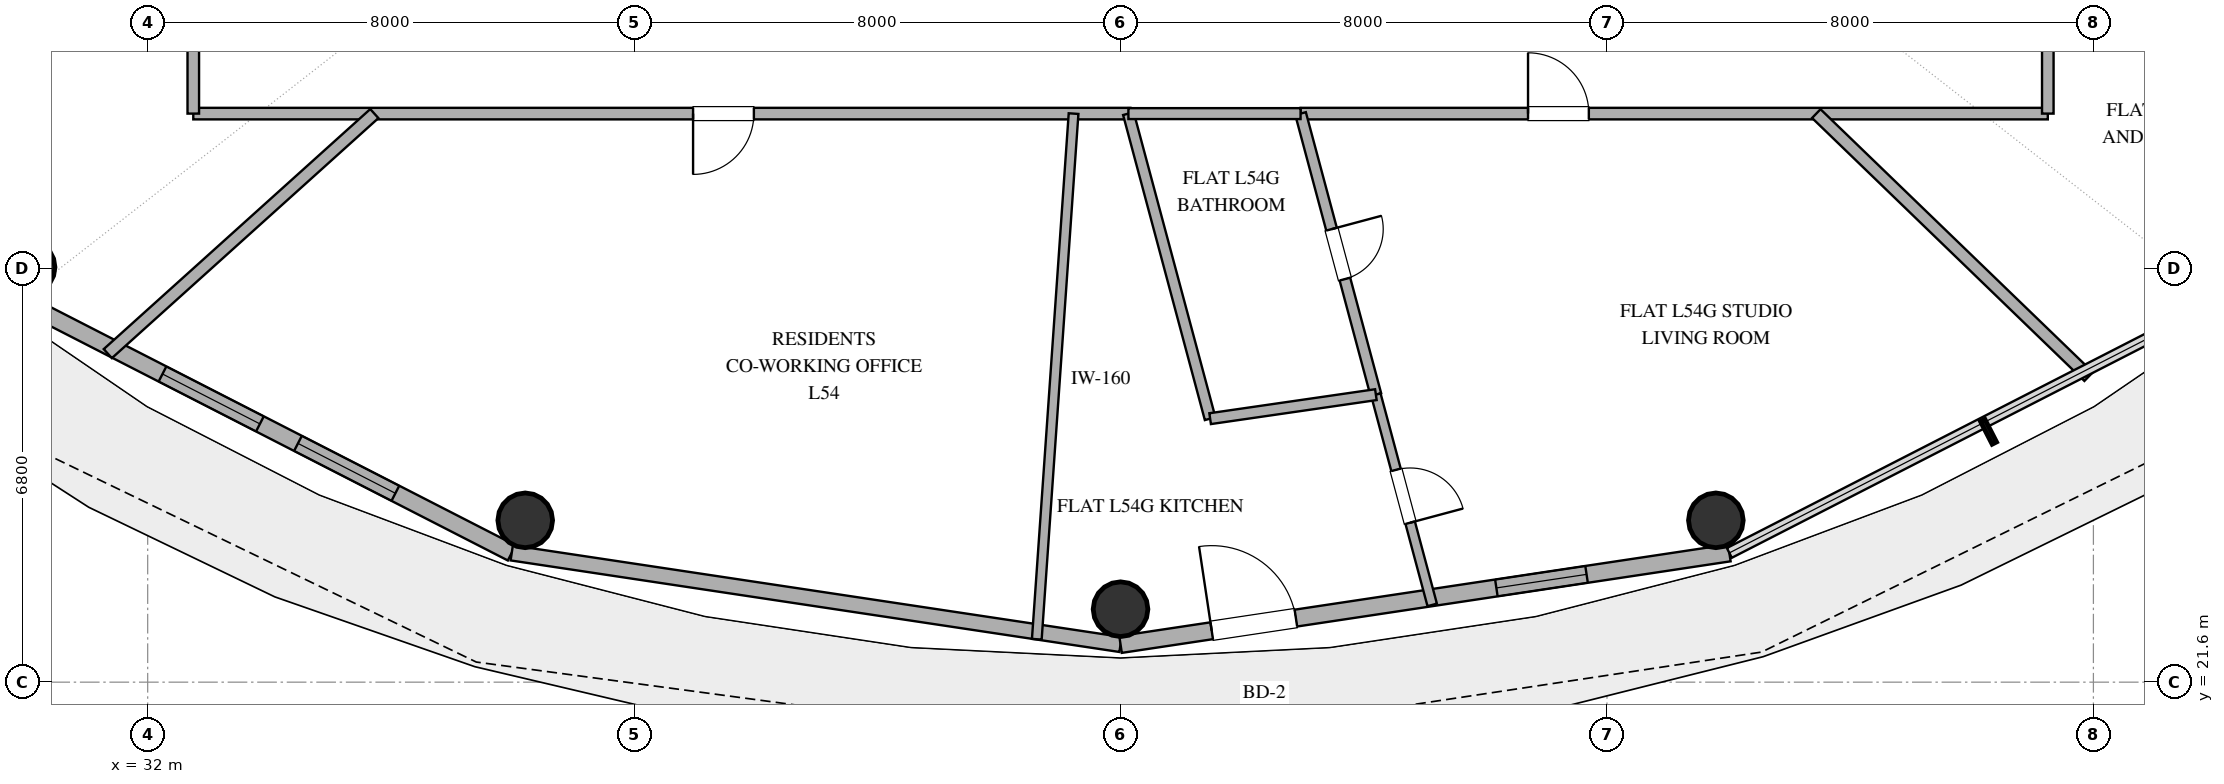
"""IFC4 building model, lengths in metres.
Left out: names, types, materials, properties, quantities, classifications, styles, units other than length and angle.
Written with IfcOpenShell. Run it as: python <this file> out.ifc"""

import sys

from ifc_helpers import new_model, si_unit, direction, frame, frame_2d, origin, origin_2d, place, context, subcontext, project, spatial, rectangle, hollow_circle, extrude, element, fill, save


model = new_model("IFC4")
c1 = context("Model", 3, precision=1e-05, world=origin(), true_north=direction((0.0, 1.0)))
c2 = subcontext(c1, "Body", "Model", "MODEL_VIEW")
j1 = project(units=[si_unit("LENGTHUNIT", "METRE"), si_unit("PLANEANGLEUNIT", "RADIAN")], contexts=[c1])
p1 = place(None, origin())
s1 = spatial("IfcSite", under=j1, at=p1, CompositionType="ELEMENT")
p2 = place(p1, origin())
s2 = spatial("IfcBuilding", under=s1, at=p2, CompositionType="ELEMENT")
p3 = place(p2, frame((0.0, 0.0, 213.6)))
s3 = spatial("IfcBuildingStorey", under=s2, at=p3, CompositionType="ELEMENT", Elevation=213.6)
for number, where, z_axis, x_axis in (
    (1, (30.025, 28.424, 0.0), (0.0, 0.0, 1.0), (1.0, 0.0, 0.0)),
    (2, (38.209, 24.261, 0.0), (0.0, 0.0, 1.0), (1.0, 0.0, 0.0)),
    (3, (48.0, 22.8, 0.0), (0.0, 0.0, 1.0), (1.0, 0.0, 0.0)),
    (4, (57.791, 24.261, 0.0), (0.0, 0.0, 1.0), (1.0, 0.0, 0.0)),
):
    element("IfcColumn", number, at=place(p3, frame(where, z_axis=z_axis, x_axis=x_axis)), inside=s3, PredefinedType="COLUMN", context=c2, shape_type="SweptSolid", body=[
        extrude(hollow_circle(Radius=0.45, WallThickness=0.025, at=origin_2d()), origin(), (0.0, 0.0, 1.0), 3.36),
    ])
p4 = place(p3, frame((29.617, 28.013, 0.0), z_axis=(0.0, 0.0, 1.0), x_axis=(0.890007394051, -0.455946091699, 0.0)))
e5 = element("IfcWall", 5, at=p4, inside=s3, PredefinedType="SOLIDWALL", context=c2, shape_type="SweptSolid", body=[
    extrude(rectangle(XDim=9.404, YDim=0.28, at=frame_2d((4.702, 0.0))), origin(), (0.0, 0.0, 1.0), 3.36),
])
p5 = place(p4, frame((2.951, 0.0, 0.85)))
e6 = element("IfcOpeningElement", 6, at=p5, cuts=e5, PredefinedType="OPENING", context=c2, shape_type="SweptSolid", body=[
    extrude(rectangle(XDim=1.8, YDim=2.2, at=frame_2d((0.9, 1.1))), frame((0.0, 0.15, 0.0), z_axis=(0.0, -1.0, 0.0), x_axis=(1.0, 0.0, 0.0)), (0.0, 0.0, 1.0), 0.3),
])
p6 = place(p4, frame((5.454, 0.0, 0.85)))
e7 = element("IfcOpeningElement", 7, at=p6, cuts=e5, PredefinedType="OPENING", context=c2, shape_type="SweptSolid", body=[
    extrude(rectangle(XDim=1.8, YDim=2.2, at=frame_2d((0.9, 1.1))), frame((0.0, 0.15, 0.0), z_axis=(0.0, -1.0, 0.0), x_axis=(1.0, 0.0, 0.0)), (0.0, 0.0, 1.0), 0.3),
])
p7 = place(p3, frame((37.987, 23.726, 0.0), z_axis=(0.0, 0.0, 1.0), x_axis=(0.988882522213, -0.148698881169, 0.0)))
e8 = element("IfcWall", 8, at=p7, inside=s3, PredefinedType="SOLIDWALL", context=c2, shape_type="SweptSolid", body=[
    extrude(rectangle(XDim=10.125, YDim=0.25, at=frame_2d((5.062, 0.0))), origin(), (0.0, 0.0, 1.0), 3.36),
])
p8 = place(p3, frame((48.0, 22.22, 0.0), z_axis=(0.0, 0.0, 1.0), x_axis=(0.988882522213, 0.148698881169, 0.0)))
e9 = element("IfcWall", 9, at=p8, inside=s3, PredefinedType="SOLIDWALL", context=c2, shape_type="SweptSolid", body=[
    extrude(rectangle(XDim=10.125, YDim=0.28, at=frame_2d((5.062, 0.0))), origin(), (0.0, 0.0, 1.0), 3.36),
])
p9 = place(p8, frame((1.516, 0.0, 0.0)))
e10 = element("IfcOpeningElement", 10, at=p9, cuts=e9, PredefinedType="OPENING", context=c2, shape_type="SweptSolid", body=[
    extrude(rectangle(XDim=1.4, YDim=2.2, at=frame_2d((0.7, 1.1))), frame((0.0, 0.15, 0.0), z_axis=(0.0, -1.0, 0.0), x_axis=(1.0, 0.0, 0.0)), (0.0, 0.0, 1.0), 0.3),
])
p10 = place(p8, frame((6.25, 0.0, 0.85)))
e11 = element("IfcOpeningElement", 11, at=p10, cuts=e9, PredefinedType="OPENING", context=c2, shape_type="SweptSolid", body=[
    extrude(rectangle(XDim=1.5, YDim=1.8, at=frame_2d((0.75, 0.9))), frame((0.0, 0.15, 0.0), z_axis=(0.0, -1.0, 0.0), x_axis=(1.0, 0.0, 0.0)), (0.0, 0.0, 1.0), 0.3),
])
p11 = place(p3, frame((48.162, 30.95, 0.0), z_axis=(0.0, 0.0, 1.0), x_axis=(-1.0, 0.0, 0.0)))
e12 = element("IfcWall", 12, at=p11, inside=s3, PredefinedType="PARTITIONING", context=c2, shape_type="SweptSolid", body=[
    extrude(rectangle(XDim=15.412, YDim=0.19, at=frame_2d((7.706, 0.0))), origin(), (0.0, 0.0, 1.0), 2.72),
])
p12 = place(p11, frame((6.193, 0.0, 0.0)))
e13 = element("IfcOpeningElement", 13, at=p12, cuts=e12, PredefinedType="OPENING", context=c2, shape_type="SweptSolid", body=[
    extrude(rectangle(XDim=1.0, YDim=2.2, at=frame_2d((0.5, 1.1))), frame((0.0, 0.105, 0.0), z_axis=(0.0, -1.0, 0.0), x_axis=(1.0, 0.0, 0.0)), (0.0, 0.0, 1.0), 0.21),
])
p13 = place(p3, frame((47.227, 30.95, 0.0), z_axis=(0.0, 0.0, 1.0), x_axis=(-0.069763237321, -0.997563577281, 0.0)))
e14 = element("IfcWall", 14, at=p13, inside=s3, PredefinedType="PLUMBINGWALL", context=c2, shape_type="SweptSolid", body=[
    extrude(rectangle(XDim=8.665, YDim=0.16, at=frame_2d((4.333, 0.0))), origin(), (0.0, 0.0, 1.0), 2.72),
])
p14 = place(p3, frame((50.961, 30.95, 0.0), z_axis=(0.0, 0.0, 1.0), x_axis=(1.0, 0.0, 0.0)))
e15 = element("IfcWall", 15, at=p14, inside=s3, PredefinedType="PARTITIONING", context=c2, shape_type="SweptSolid", body=[
    extrude(rectangle(XDim=12.289, YDim=0.19, at=frame_2d((6.145, 0.0))), origin(), (0.0, 0.0, 1.0), 2.72),
])
p15 = place(p14, frame((3.741, 0.0, 0.0)))
e16 = element("IfcOpeningElement", 16, at=p15, cuts=e15, PredefinedType="OPENING", context=c2, shape_type="SweptSolid", body=[
    extrude(rectangle(XDim=1.0, YDim=2.2, at=frame_2d((0.5, 1.1))), frame((0.0, 0.105, 0.0), z_axis=(0.0, -1.0, 0.0), x_axis=(1.0, 0.0, 0.0)), (0.0, 0.0, 1.0), 0.21),
])
p16 = place(p3, frame((32.75, 30.95, 0.0), z_axis=(0.0, 0.0, 1.0), x_axis=(0.0, 1.0, 0.0)))
e17 = element("IfcWall", 17, at=p16, inside=s3, PredefinedType="PARTITIONING", context=c2, shape_type="SweptSolid", body=[
    extrude(rectangle(XDim=12.148, YDim=0.19, at=frame_2d((6.074, 0.0))), origin(), (0.0, 0.0, 1.0), 2.72),
])
p17 = place(p16, frame((3.214, 0.0, 0.0)))
e18 = element("IfcOpeningElement", 18, at=p17, cuts=e17, PredefinedType="OPENING", context=c2, shape_type="SweptSolid", body=[
    extrude(rectangle(XDim=1.0, YDim=2.2, at=frame_2d((0.5, 1.1))), frame((0.0, 0.105, 0.0), z_axis=(0.0, -1.0, 0.0), x_axis=(1.0, 0.0, 0.0)), (0.0, 0.0, 1.0), 0.21),
])
p18 = place(p3, frame((63.921, 26.625, 0.0), z_axis=(0.0, 0.0, 1.0), x_axis=(-0.719350784266, 0.69464699609, 0.0)))
e19 = element("IfcWall", 19, at=p18, inside=s3, PredefinedType="PARTITIONING", context=c2, shape_type="SweptSolid", body=[
    extrude(rectangle(XDim=6.226, YDim=0.2, at=frame_2d((3.113, 0.0))), origin(), (0.0, 0.0, 1.0), 2.72),
])
p19 = place(p3, frame((63.25, 45.419, 0.0), z_axis=(0.0, 0.0, 1.0), x_axis=(0.0, -1.0, 0.0)))
e20 = element("IfcWall", 20, at=p19, inside=s3, PredefinedType="PARTITIONING", context=c2, shape_type="SweptSolid", body=[
    extrude(rectangle(XDim=14.469, YDim=0.19, at=frame_2d((7.235, 0.0))), origin(), (0.0, 0.0, 1.0), 2.72),
])
p20 = place(p19, frame((10.905, 0.0, 0.0)))
e21 = element("IfcOpeningElement", 21, at=p20, cuts=e20, PredefinedType="OPENING", context=c2, shape_type="SweptSolid", body=[
    extrude(rectangle(XDim=1.0, YDim=2.2, at=frame_2d((0.5, 1.1))), frame((0.0, 0.105, 0.0), z_axis=(0.0, -1.0, 0.0), x_axis=(1.0, 0.0, 0.0)), (0.0, 0.0, 1.0), 0.21),
])
p21 = place(p3, frame((35.728, 30.95, 0.0), z_axis=(0.0, 0.0, 1.0), x_axis=(-0.743158305959, -0.669115634464, 0.0)))
e22 = element("IfcWall", 22, at=p21, inside=s3, PredefinedType="PARTITIONING", context=c2, shape_type="SweptSolid", body=[
    extrude(rectangle(XDim=5.899, YDim=0.2, at=frame_2d((2.949, 0.0))), origin(), (0.0, 0.0, 1.0), 2.72),
])
p22 = place(p3, frame((49.473, 25.933, 0.0), z_axis=(0.0, 0.0, 1.0), x_axis=(-0.258826939486, 0.965923710961, 0.0)))
e23 = element("IfcWall", 23, at=p22, inside=s3, PredefinedType="PLUMBINGWALL", context=c2, shape_type="SweptSolid", body=[
    extrude(rectangle(XDim=5.194, YDim=0.18, at=frame_2d((2.597, 0.0))), origin(), (0.0, 0.0, 1.0), 2.72),
])
p23 = place(p3, frame((50.961, 30.95, 0.0), z_axis=(0.0, 0.0, 1.0), x_axis=(0.258827893949, -0.965923455204, 0.0)))
e24 = element("IfcWall", 24, at=p23, inside=s3, PredefinedType="PLUMBINGWALL", context=c2, shape_type="SweptSolid", body=[
    extrude(rectangle(XDim=4.785, YDim=0.18, at=frame_2d((2.393, 0.0))), origin(), (0.0, 0.0, 1.0), 2.72),
])
p24 = place(p23, frame((1.968, 0.0, 0.0)))
e25 = element("IfcOpeningElement", 25, at=p24, cuts=e24, PredefinedType="OPENING", context=c2, shape_type="SweptSolid", body=[
    extrude(rectangle(XDim=0.85, YDim=2.1, at=frame_2d((0.425, 1.05))), frame((0.0, 0.1, 0.0), z_axis=(0.0, -1.0, 0.0), x_axis=(1.0, 0.0, 0.0)), (0.0, 0.0, 1.0), 0.2),
])
p25 = place(p3, frame((52.199, 26.328, 0.0), z_axis=(0.0, 0.0, 1.0), x_axis=(0.258821309613, -0.965925219512, 0.0)))
e26 = element("IfcWall", 26, at=p25, inside=s3, PredefinedType="PLUMBINGWALL", context=c2, shape_type="SweptSolid", body=[
    extrude(rectangle(XDim=3.58, YDim=0.16, at=frame_2d((1.79, 0.0))), origin(), (0.0, 0.0, 1.0), 2.72),
])
p26 = place(p25, frame((1.28, 0.0, 0.0)))
e27 = element("IfcOpeningElement", 27, at=p26, cuts=e26, PredefinedType="OPENING", context=c2, shape_type="SweptSolid", body=[
    extrude(rectangle(XDim=0.9, YDim=2.1, at=frame_2d((0.45, 1.05))), frame((0.0, 0.09, 0.0), z_axis=(0.0, -1.0, 0.0), x_axis=(1.0, 0.0, 0.0)), (0.0, 0.0, 1.0), 0.18),
])
p27 = place(p3, frame((48.129, 30.95, 0.0), z_axis=(0.0, 0.0, 1.0), x_axis=(1.0, 0.0, 0.0)))
e28 = element("IfcWall", 28, at=p27, inside=s3, PredefinedType="PLUMBINGWALL", context=c2, shape_type="SweptSolid", body=[
    extrude(rectangle(XDim=2.832, YDim=0.18, at=frame_2d((1.416, 0.0))), origin(), (0.0, 0.0, 1.0), 2.72),
])
p28 = place(p3, frame((52.199, 26.328, 0.0), z_axis=(0.0, 0.0, 1.0), x_axis=(-0.989687205531, -0.143245367142, 0.0)))
e29 = element("IfcWall", 29, at=p28, inside=s3, PredefinedType="PLUMBINGWALL", context=c2, shape_type="SweptSolid", body=[
    extrude(rectangle(XDim=2.754, YDim=0.18, at=frame_2d((1.377, 0.0))), origin(), (0.0, 0.0, 1.0), 2.72),
])
p29 = place(p5, origin())
e30 = element("IfcWindow", 30, at=p29, inside=s3, PartitioningType="SINGLE_PANEL", PredefinedType="WINDOW", context=c2, shape_type="SweptSolid", body=[
    extrude(rectangle(XDim=1.8, YDim=2.2, at=frame_2d((0.9, 1.1))), frame((0.0, 0.03, 0.0), z_axis=(0.0, -1.0, 0.0), x_axis=(1.0, 0.0, 0.0)), (0.0, 0.0, 1.0), 0.06),
])
fill(e6, e30)
p30 = place(p6, origin())
e31 = element("IfcWindow", 31, at=p30, inside=s3, PartitioningType="SINGLE_PANEL", PredefinedType="WINDOW", context=c2, shape_type="SweptSolid", body=[
    extrude(rectangle(XDim=1.8, YDim=2.2, at=frame_2d((0.9, 1.1))), frame((0.0, 0.03, 0.0), z_axis=(0.0, -1.0, 0.0), x_axis=(1.0, 0.0, 0.0)), (0.0, 0.0, 1.0), 0.06),
])
fill(e7, e31)
p31 = place(p9, origin())
e32 = element("IfcDoor", 32, at=p31, inside=s3, OperationType="SINGLE_SWING_LEFT", PredefinedType="DOOR", context=c2, shape_type="SweptSolid", body=[
    extrude(rectangle(XDim=1.4, YDim=2.2, at=frame_2d((0.7, 1.1))), frame((0.0, 0.025, 0.0), z_axis=(0.0, -1.0, 0.0), x_axis=(1.0, 0.0, 0.0)), (0.0, 0.0, 1.0), 0.05),
])
fill(e10, e32)
p32 = place(p10, origin())
e33 = element("IfcWindow", 33, at=p32, inside=s3, PartitioningType="SINGLE_PANEL", PredefinedType="WINDOW", context=c2, shape_type="SweptSolid", body=[
    extrude(rectangle(XDim=1.5, YDim=1.8, at=frame_2d((0.75, 0.9))), frame((0.0, 0.03, 0.0), z_axis=(0.0, -1.0, 0.0), x_axis=(1.0, 0.0, 0.0)), (0.0, 0.0, 1.0), 0.06),
])
fill(e11, e33)
p33 = place(p12, origin())
e34 = element("IfcDoor", 34, at=p33, inside=s3, OperationType="SINGLE_SWING_RIGHT", PredefinedType="DOOR", context=c2, shape_type="SweptSolid", body=[
    extrude(rectangle(XDim=1.0, YDim=2.2, at=frame_2d((0.5, 1.1))), frame((0.0, 0.025, 0.0), z_axis=(0.0, -1.0, 0.0), x_axis=(1.0, 0.0, 0.0)), (0.0, 0.0, 1.0), 0.05),
])
fill(e13, e34)
p34 = place(p15, origin())
e35 = element("IfcDoor", 35, at=p34, inside=s3, OperationType="SINGLE_SWING_LEFT", PredefinedType="DOOR", context=c2, shape_type="SweptSolid", body=[
    extrude(rectangle(XDim=1.0, YDim=2.2, at=frame_2d((0.5, 1.1))), frame((0.0, 0.025, 0.0), z_axis=(0.0, -1.0, 0.0), x_axis=(1.0, 0.0, 0.0)), (0.0, 0.0, 1.0), 0.05),
])
fill(e16, e35)
p35 = place(p24, origin())
e36 = element("IfcDoor", 36, at=p35, inside=s3, OperationType="SINGLE_SWING_LEFT", PredefinedType="DOOR", context=c2, shape_type="SweptSolid", body=[
    extrude(rectangle(XDim=0.85, YDim=2.1, at=frame_2d((0.425, 1.05))), frame((0.0, 0.025, 0.0), z_axis=(0.0, -1.0, 0.0), x_axis=(1.0, 0.0, 0.0)), (0.0, 0.0, 1.0), 0.05),
])
fill(e25, e36)
p36 = place(p26, origin())
e37 = element("IfcDoor", 37, at=p36, inside=s3, OperationType="SINGLE_SWING_RIGHT", PredefinedType="DOOR", context=c2, shape_type="SweptSolid", body=[
    extrude(rectangle(XDim=0.9, YDim=2.1, at=frame_2d((0.45, 1.05))), frame((0.0, 0.025, 0.0), z_axis=(0.0, -1.0, 0.0), x_axis=(1.0, 0.0, 0.0)), (0.0, 0.0, 1.0), 0.05),
])
fill(e27, e37)
save(model, sys.argv[1])
